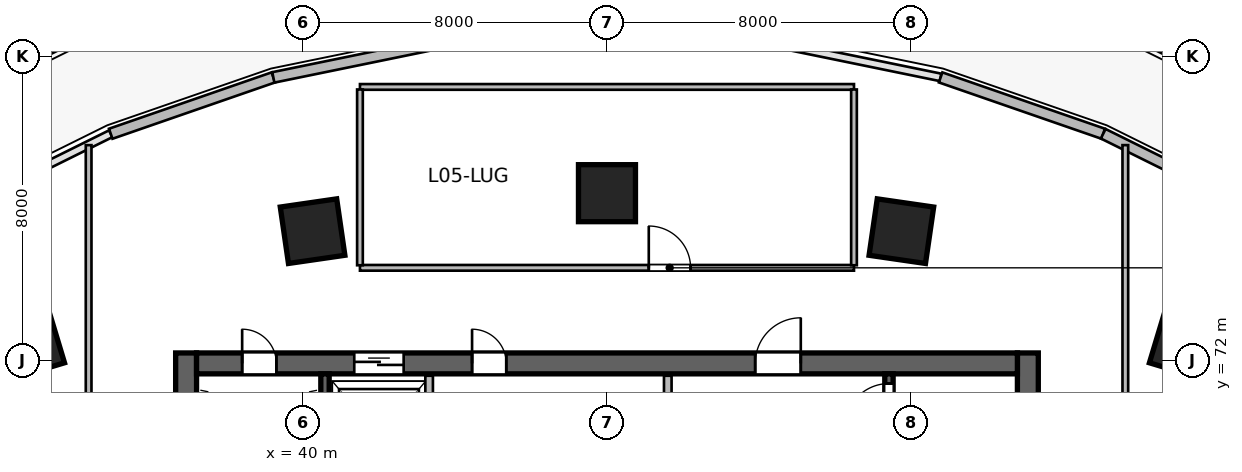
"""IFC4 building model, lengths in metres.
Left out: names, types, materials, properties, quantities, classifications, styles, units other than length and angle.
Written with IfcOpenShell. Run it as: python <this file> out.ifc"""

import sys

from ifc_helpers import new_model, si_unit, direction, frame, frame_2d, origin, origin_2d, place, context, subcontext, project, spatial, rectangle, extrude, source, transform, mapped, element, fill, save


model = new_model("IFC4")
c1 = context("Model", 3, precision=1e-05, world=origin(), true_north=direction((0.0, 1.0)))
c2 = subcontext(c1, "Body", "Model", "MODEL_VIEW")
j1 = project(units=[si_unit("LENGTHUNIT", "METRE"), si_unit("PLANEANGLEUNIT", "RADIAN")], contexts=[c1])
p1 = place(None, origin())
s1 = spatial("IfcSite", under=j1, at=p1, CompositionType="ELEMENT")
p2 = place(p1, origin())
s2 = spatial("IfcBuilding", under=s1, at=p2, CompositionType="ELEMENT")
p3 = place(p2, frame((0.0, 0.0, 30.0)))
s3 = spatial("IfcBuildingStorey", under=s2, at=p3, CompositionType="ELEMENT", Elevation=30.0)
m1 = source(origin(), c2, "Body", "SweptSolid", [
    extrude(rectangle(XDim=12.0, YDim=0.55, at=frame_2d((6.0, 0.0))), origin(), (0.0, 0.0, 1.0), 5.4),
])
for number, where, z_axis, x_axis in (
    (1, (36.925, 60.2, 0.0), (0.0, 0.0, 1.0), (0.0, 1.0, 0.0)),
    (2, (59.075, 60.2, 0.0), (0.0, 0.0, 1.0), (0.0, 1.0, 0.0)),
):
    element("IfcWall", number, at=place(p3, frame(where, z_axis=z_axis, x_axis=x_axis)), inside=s3, PredefinedType="SHEAR", context=c2, shape_type="MappedRepresentation", body=[
        mapped(m1, transform((0.0, 0.0, 0.0), scale=1.0)),
    ])
m2 = source(origin(), c2, "Body", "SweptSolid", [
    extrude(rectangle(XDim=21.6, YDim=0.55, at=frame_2d((10.8, 0.0))), origin(), (0.0, 0.0, 1.0), 5.4),
])
p4 = place(p3, frame((37.2, 71.925, 0.0), z_axis=(0.0, 0.0, 1.0), x_axis=(1.0, 0.0, 0.0)))
e3 = element("IfcWall", 3, at=p4, inside=s3, PredefinedType="SHEAR", context=c2, shape_type="MappedRepresentation", body=[
    mapped(m2, transform((0.0, 0.0, 0.0), scale=1.0)),
])
p5 = place(p4, frame((1.2, 0.0, 0.0)))
e4 = element("IfcOpeningElement", 4, at=p5, cuts=e3, PredefinedType="OPENING", context=c2, shape_type="SweptSolid", body=[
    extrude(rectangle(XDim=0.9, YDim=2.1, at=frame_2d((0.45, 1.05))), frame((0.0, 0.285, 0.0), z_axis=(0.0, -1.0, 0.0), x_axis=(1.0, 0.0, 0.0)), (0.0, 0.0, 1.0), 0.57),
])
p6 = place(p4, frame((14.7, 0.0, 0.0)))
e5 = element("IfcOpeningElement", 5, at=p6, cuts=e3, PredefinedType="OPENING", context=c2, shape_type="SweptSolid", body=[
    extrude(rectangle(XDim=1.2, YDim=2.15, at=frame_2d((0.6, 1.075))), frame((0.0, 0.285, 0.0), z_axis=(0.0, -1.0, 0.0), x_axis=(1.0, 0.0, 0.0)), (0.0, 0.0, 1.0), 0.57),
])
p7 = place(p4, frame((4.15, 0.0, 0.0)))
e6 = element("IfcOpeningElement", 6, at=p7, cuts=e3, PredefinedType="OPENING", context=c2, shape_type="SweptSolid", body=[
    extrude(rectangle(XDim=1.3, YDim=2.15, at=frame_2d((0.65, 1.075))), frame((0.0, 0.285, 0.0), z_axis=(0.0, -1.0, 0.0), x_axis=(1.0, 0.0, 0.0)), (0.0, 0.0, 1.0), 0.57),
])
p8 = place(p4, frame((7.25, 0.0, 0.0)))
e7 = element("IfcOpeningElement", 7, at=p8, cuts=e3, PredefinedType="OPENING", context=c2, shape_type="SweptSolid", body=[
    extrude(rectangle(XDim=0.9, YDim=2.1, at=frame_2d((0.45, 1.05))), frame((0.0, 0.285, 0.0), z_axis=(0.0, -1.0, 0.0), x_axis=(1.0, 0.0, 0.0)), (0.0, 0.0, 1.0), 0.57),
])
m3 = source(origin(), c2, "Body", "SweptSolid", [
    extrude(rectangle(XDim=10.9, YDim=0.22, at=frame_2d((5.45, 0.0))), origin(), (0.0, 0.0, 1.0), 5.4),
])
p9 = place(p3, frame((40.58, 60.75, 0.0), z_axis=(0.0, 0.0, 1.0), x_axis=(0.0, 1.0, 0.0)))
e8 = element("IfcWall", 8, at=p9, inside=s3, PredefinedType="SHEAR", context=c2, shape_type="MappedRepresentation", body=[
    mapped(m3, transform((0.0, 0.0, 0.0), scale=1.0)),
])
p10 = place(p3, frame((55.42, 60.75, 0.0), z_axis=(0.0, 0.0, 1.0), x_axis=(0.0, 1.0, 0.0)))
e9 = element("IfcWall", 9, at=p10, inside=s3, PredefinedType="SHEAR", context=c2, shape_type="MappedRepresentation", body=[
    mapped(m3, transform((0.0, 0.0, 0.0), scale=1.0)),
])
p11 = place(p10, frame((9.495, 0.0, 0.0)))
e10 = element("IfcOpeningElement", 10, at=p11, cuts=e9, PredefinedType="OPENING", context=c2, shape_type="SweptSolid", body=[
    extrude(rectangle(XDim=1.15, YDim=2.15, at=frame_2d((0.575, 1.075))), frame((0.0, 0.12, 0.0), z_axis=(0.0, -1.0, 0.0), x_axis=(1.0, 0.0, 0.0)), (0.0, 0.0, 1.0), 0.24),
])
m4 = source(origin(), c2, "Body", "SweptSolid", [
    extrude(rectangle(XDim=1.5, YDim=1.5, at=origin_2d()), origin(), (0.0, 0.0, 1.0), 5.4),
])
for number, where, z_axis, x_axis in (
    (11, (32.791, 72.442, 0.0), (0.0, 0.0, 1.0), (-0.289, 0.957, 0.0)),
    (12, (40.253, 75.404, 0.0), (0.0, 0.0, 1.0), (-0.143, 0.99, 0.0)),
    (13, (48.0, 76.404, 0.0), (0.0, 0.0, 1.0), (0.0, 1.0, 0.0)),
    (14, (55.747, 75.404, 0.0), (0.0, 0.0, 1.0), (0.143, 0.99, 0.0)),
    (15, (63.209, 72.442, 0.0), (0.0, 0.0, 1.0), (0.289, 0.957, 0.0)),
):
    element("IfcColumn", number, at=place(p3, frame(where, z_axis=z_axis, x_axis=x_axis)), inside=s3, PredefinedType="COLUMN", context=c2, shape_type="MappedRepresentation", body=[
        mapped(m4, transform((0.0, 0.0, 0.0), scale=1.0)),
    ])
m5 = source(origin(), c2, "Body", "SweptSolid", [
    extrude(rectangle(XDim=4.528, YDim=0.28, at=frame_2d((2.264, 0.0))), origin(), (0.0, 0.0, 1.0), 5.16),
])
p12 = place(p3, frame((34.942, 77.968, 0.0), z_axis=(0.0, 0.0, 1.0), x_axis=(0.944875124863, 0.327430906322, 0.0)))
e16 = element("IfcWall", 16, at=p12, inside=s3, PredefinedType="SOLIDWALL", context=c2, shape_type="MappedRepresentation", body=[
    mapped(m5, transform((0.0, 0.0, 0.0), scale=1.0)),
])
m6 = source(origin(), c2, "Body", "SweptSolid", [
    extrude(rectangle(XDim=4.458, YDim=0.28, at=frame_2d((2.229, 0.0))), origin(), (0.0, 0.0, 1.0), 5.16),
])
p13 = place(p3, frame((39.22, 79.45, 0.0), z_axis=(0.0, 0.0, 1.0), x_axis=(0.979608504488, 0.200915847893, 0.0)))
e17 = element("IfcWall", 17, at=p13, inside=s3, PredefinedType="SOLIDWALL", context=c2, shape_type="MappedRepresentation", body=[
    mapped(m6, transform((0.0, 0.0, 0.0), scale=1.0)),
])
p14 = place(p3, frame((56.78, 79.45, 0.0), z_axis=(0.0, 0.0, 1.0), x_axis=(0.944875124863, -0.327430906322, 0.0)))
e18 = element("IfcWall", 18, at=p14, inside=s3, PredefinedType="SOLIDWALL", context=c2, shape_type="MappedRepresentation", body=[
    mapped(m5, transform((0.0, 0.0, 0.0), scale=1.0)),
])
m7 = source(origin(), c2, "Body", "SweptSolid", [
    extrude(rectangle(XDim=4.628, YDim=0.28, at=frame_2d((2.314, 0.0))), origin(), (0.0, 0.0, 1.0), 5.16),
])
p15 = place(p3, frame((61.058, 77.968, 0.0), z_axis=(0.0, 0.0, 1.0), x_axis=(0.895972868577, -0.444108791597, 0.0)))
e19 = element("IfcWall", 19, at=p15, inside=s3, PredefinedType="SOLIDWALL", context=c2, shape_type="MappedRepresentation", body=[
    mapped(m7, transform((0.0, 0.0, 0.0), scale=1.0)),
])
m8 = source(origin(), c2, "Body", "SweptSolid", [
    extrude(rectangle(XDim=5.8, YDim=0.2, at=frame_2d((2.9, 0.0))), origin(), (0.0, 0.0, 1.0), 5.16),
])
p16 = place(p3, frame((49.6, 65.8, 0.0), z_axis=(0.0, 0.0, 1.0), x_axis=(0.0, 1.0, 0.0)))
e20 = element("IfcWall", 20, at=p16, inside=s3, PredefinedType="SOLIDWALL", context=c2, shape_type="MappedRepresentation", body=[
    mapped(m8, transform((0.0, 0.0, 0.0), scale=1.0)),
])
m9 = source(origin(), c2, "Body", "SweptSolid", [
    extrude(rectangle(XDim=3.2, YDim=0.2, at=frame_2d((1.6, 0.0))), origin(), (0.0, 0.0, 1.0), 5.16),
])
p17 = place(p3, frame((43.32, 68.4, 0.0), z_axis=(0.0, 0.0, 1.0), x_axis=(0.0, 1.0, 0.0)))
e21 = element("IfcWall", 21, at=p17, inside=s3, PredefinedType="SOLIDWALL", context=c2, shape_type="MappedRepresentation", body=[
    mapped(m9, transform((0.0, 0.0, 0.0), scale=1.0)),
])
m10 = source(origin(), c2, "Body", "SweptSolid", [
    extrude(rectangle(XDim=13.0, YDim=0.15, at=frame_2d((6.5, 0.0))), origin(), (0.0, 0.0, 1.0), 5.16),
])
p18 = place(p3, frame((41.5, 74.44, 0.0), z_axis=(0.0, 0.0, 1.0), x_axis=(1.0, 0.0, 0.0)))
e22 = element("IfcWall", 22, at=p18, inside=s3, PredefinedType="PARTITIONING", context=c2, shape_type="MappedRepresentation", body=[
    mapped(m10, transform((0.0, 0.0, 0.0), scale=1.0)),
])
p19 = place(p18, frame((7.6, 0.0, 0.0)))
e23 = element("IfcOpeningElement", 23, at=p19, cuts=e22, PredefinedType="OPENING", context=c2, shape_type="SweptSolid", body=[
    extrude(rectangle(XDim=1.1, YDim=2.15, at=frame_2d((0.55, 1.075))), frame((0.0, 0.085, 0.0), z_axis=(0.0, -1.0, 0.0), x_axis=(1.0, 0.0, 0.0)), (0.0, 0.0, 1.0), 0.17),
])
p20 = place(p3, frame((41.5, 79.2, 0.0), z_axis=(0.0, 0.0, 1.0), x_axis=(1.0, 0.0, 0.0)))
e24 = element("IfcWall", 24, at=p20, inside=s3, PredefinedType="PARTITIONING", context=c2, shape_type="MappedRepresentation", body=[
    mapped(m10, transform((0.0, 0.0, 0.0), scale=1.0)),
])
m11 = source(origin(), c2, "Body", "SweptSolid", [
    extrude(rectangle(XDim=4.625, YDim=0.15, at=frame_2d((2.312, 0.0))), origin(), (0.0, 0.0, 1.0), 5.16),
])
for number, where, z_axis, x_axis in (
    (25, (41.5, 74.508, 0.0), (0.0, 0.0, 1.0), (0.0, 1.0, 0.0)),
    (26, (54.5, 74.508, 0.0), (0.0, 0.0, 1.0), (0.0, 1.0, 0.0)),
):
    element("IfcWall", number, at=place(p3, frame(where, z_axis=z_axis, x_axis=x_axis)), inside=s3, PredefinedType="PARTITIONING", context=c2, shape_type="MappedRepresentation", body=[
        mapped(m11, transform((0.0, 0.0, 0.0), scale=1.0)),
    ])
m12 = source(origin(), c2, "Body", "SweptSolid", [
    extrude(rectangle(XDim=19.708, YDim=0.15, at=frame_2d((9.854, 0.0))), origin(), (0.0, 0.0, 1.0), 5.16),
])
p21 = place(p3, frame((34.36, 57.96, 0.0), z_axis=(0.0, 0.0, 1.0), x_axis=(0.0, 1.0, 0.0)))
e27 = element("IfcWall", 27, at=p21, inside=s3, PredefinedType="PARTITIONING", context=c2, shape_type="MappedRepresentation", body=[
    mapped(m12, transform((0.0, 0.0, 0.0), scale=1.0)),
])
p22 = place(p21, frame((9.154, 0.0, 0.0)))
e28 = element("IfcOpeningElement", 28, at=p22, cuts=e27, PredefinedType="OPENING", context=c2, shape_type="SweptSolid", body=[
    extrude(rectangle(XDim=1.4, YDim=2.15, at=frame_2d((0.7, 1.075))), frame((0.0, 0.085, 0.0), z_axis=(0.0, -1.0, 0.0), x_axis=(1.0, 0.0, 0.0)), (0.0, 0.0, 1.0), 0.17),
])
m13 = source(origin(), c2, "Body", "SweptSolid", [
    extrude(rectangle(XDim=9.618, YDim=0.15, at=frame_2d((4.809, 0.0))), origin(), (0.0, 0.0, 1.0), 5.16),
])
p23 = place(p3, frame((61.64, 68.05, 0.0), z_axis=(0.0, 0.0, 1.0), x_axis=(0.0, 1.0, 0.0)))
e29 = element("IfcWall", 29, at=p23, inside=s3, PredefinedType="PARTITIONING", context=c2, shape_type="MappedRepresentation", body=[
    mapped(m13, transform((0.0, 0.0, 0.0), scale=1.0)),
])
m14 = source(origin(), c2, "Body", "SweptSolid", [
    extrude(rectangle(XDim=0.9, YDim=2.1, at=frame_2d((0.45, 1.05))), frame((0.0, 0.025, 0.0), z_axis=(0.0, -1.0, 0.0), x_axis=(1.0, 0.0, 0.0)), (0.0, 0.0, 1.0), 0.05),
])
p24 = place(p5, origin())
e30 = element("IfcDoor", 30, at=p24, inside=s3, OperationType="SINGLE_SWING_LEFT", PredefinedType="DOOR", context=c2, shape_type="MappedRepresentation", body=[
    mapped(m14, transform((0.0, 0.0, 0.0), scale=1.0)),
])
fill(e4, e30)
m15 = source(origin(), c2, "Body", "SweptSolid", [
    extrude(rectangle(XDim=1.15, YDim=2.15, at=frame_2d((0.575, 1.075))), frame((0.0, 0.025, 0.0), z_axis=(0.0, -1.0, 0.0), x_axis=(1.0, 0.0, 0.0)), (0.0, 0.0, 1.0), 0.05),
])
p25 = place(p11, origin())
e31 = element("IfcDoor", 31, at=p25, inside=s3, OperationType="SINGLE_SWING_LEFT", PredefinedType="DOOR", context=c2, shape_type="MappedRepresentation", body=[
    mapped(m15, transform((0.0, 0.0, 0.0), scale=1.0)),
])
fill(e10, e31)
m16 = source(origin(), c2, "Body", "SweptSolid", [
    extrude(rectangle(XDim=1.2, YDim=2.15, at=frame_2d((0.6, 1.075))), frame((0.0, 0.025, 0.0), z_axis=(0.0, -1.0, 0.0), x_axis=(1.0, 0.0, 0.0)), (0.0, 0.0, 1.0), 0.05),
])
p26 = place(p6, origin())
e32 = element("IfcDoor", 32, at=p26, inside=s3, OperationType="SINGLE_SWING_RIGHT", PredefinedType="DOOR", context=c2, shape_type="MappedRepresentation", body=[
    mapped(m16, transform((0.0, 0.0, 0.0), scale=1.0)),
])
fill(e5, e32)
m17 = source(origin(), c2, "Body", "SweptSolid", [
    extrude(rectangle(XDim=1.3, YDim=2.15, at=frame_2d((0.65, 1.075))), frame((0.0, 0.025, 0.0), z_axis=(0.0, -1.0, 0.0), x_axis=(1.0, 0.0, 0.0)), (0.0, 0.0, 1.0), 0.05),
])
p27 = place(p7, origin())
e33 = element("IfcDoor", 33, at=p27, inside=s3, OperationType="DOUBLE_DOOR_SLIDING", PredefinedType="DOOR", context=c2, shape_type="MappedRepresentation", body=[
    mapped(m17, transform((0.0, 0.0, 0.0), scale=1.0)),
])
fill(e6, e33)
p28 = place(p8, origin())
e34 = element("IfcDoor", 34, at=p28, inside=s3, OperationType="SINGLE_SWING_LEFT", PredefinedType="DOOR", context=c2, shape_type="MappedRepresentation", body=[
    mapped(m14, transform((0.0, 0.0, 0.0), scale=1.0)),
])
fill(e7, e34)
m18 = source(origin(), c2, "Body", "SweptSolid", [
    extrude(rectangle(XDim=1.1, YDim=2.15, at=frame_2d((0.55, 1.075))), frame((0.0, 0.025, 0.0), z_axis=(0.0, -1.0, 0.0), x_axis=(1.0, 0.0, 0.0)), (0.0, 0.0, 1.0), 0.05),
])
p29 = place(p19, origin())
e35 = element("IfcDoor", 35, at=p29, inside=s3, OperationType="SINGLE_SWING_LEFT", PredefinedType="DOOR", context=c2, shape_type="MappedRepresentation", body=[
    mapped(m18, transform((0.0, 0.0, 0.0), scale=1.0)),
])
fill(e23, e35)
save(model, sys.argv[1])
